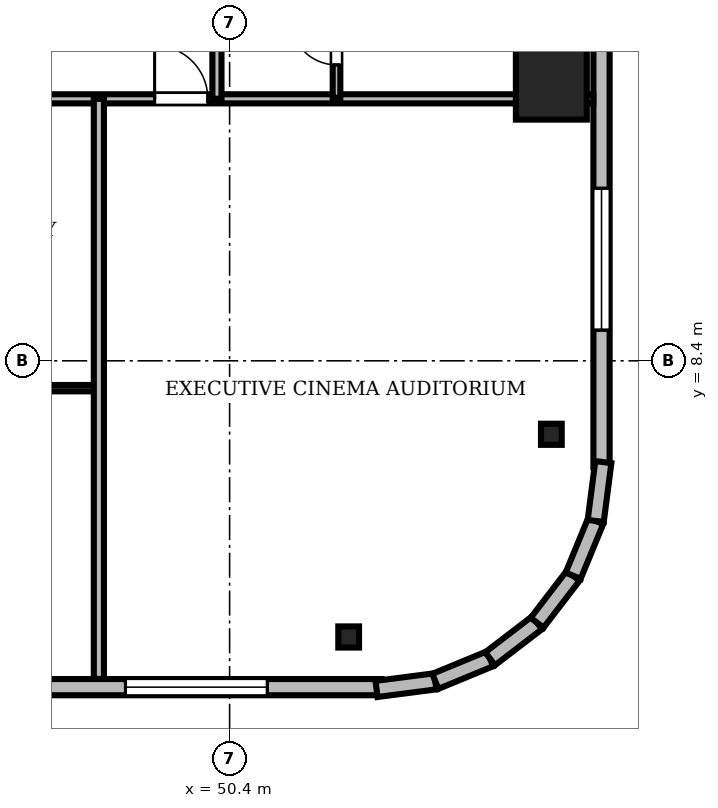
"""IFC4 building model, lengths in metres.
Left out: names, types, materials, properties, quantities, classifications, styles, units other than length and angle.
Written with IfcOpenShell. Run it as: python <this file> out.ifc"""

import sys

from ifc_helpers import new_model, si_unit, direction, frame, frame_2d, origin, origin_2d, place, context, subcontext, project, spatial, rectangle, i_section, extrude, source, transform, mapped, element, fill, save


model = new_model("IFC4")
c1 = context("Model", 3, precision=1e-05, world=origin(), true_north=direction((0.0, 1.0)))
c2 = subcontext(c1, "Body", "Model", "MODEL_VIEW")
j1 = project(units=[si_unit("LENGTHUNIT", "METRE"), si_unit("PLANEANGLEUNIT", "RADIAN")], contexts=[c1])
p1 = place(None, origin())
s1 = spatial("IfcSite", under=j1, at=p1, CompositionType="ELEMENT")
p2 = place(p1, origin())
s2 = spatial("IfcBuilding", under=s1, at=p2, CompositionType="ELEMENT")
p3 = place(p2, frame((0.0, 0.0, 218.55)))
s3 = spatial("IfcBuildingStorey", under=s2, at=p3, CompositionType="ELEMENT", Elevation=218.55)
m1 = source(origin(), c2, "Body", "SweptSolid", [
    extrude(rectangle(XDim=1.4, YDim=1.4, at=origin_2d()), origin(), (0.0, 0.0, 1.0), 3.53),
])
p4 = place(p3, frame((56.75, 13.86, 0.0), z_axis=(0.0, 0.0, 1.0), x_axis=(1.0, 0.0, 0.0)))
e1 = element("IfcColumn", 1, at=p4, inside=s3, PredefinedType="COLUMN", context=c2, shape_type="MappedRepresentation", body=[
    mapped(m1, transform((0.0, 0.0, 0.0), scale=1.0)),
])
m2 = source(origin(), c2, "Body", "SweptSolid", [
    extrude(i_section(OverallWidth=0.409, OverallDepth=0.417, WebThickness=0.021, FlangeThickness=0.033, FilletRadius=0.015, at=origin_2d()), origin(), (0.0, 0.0, 1.0), 3.53),
])
for number, where, z_axis, x_axis in (
    (2, (52.75, 2.95, 0.0), (0.0, 0.0, 1.0), (1.0, 0.0, 0.0)),
    (3, (56.75, 6.95, 0.0), (0.0, 0.0, 1.0), (1.0, 0.0, 0.0)),
):
    element("IfcColumn", number, at=place(p3, frame(where, z_axis=z_axis, x_axis=x_axis)), inside=s3, PredefinedType="COLUMN", context=c2, shape_type="MappedRepresentation", body=[
        mapped(m2, transform((0.0, 0.0, 0.0), scale=1.0)),
    ])
m3 = source(origin(), c2, "Body", "SweptSolid", [
    extrude(rectangle(XDim=15.6, YDim=0.32, at=frame_2d((7.8, 0.0))), origin(), (0.0, 0.0, 1.0), 3.53),
])
p5 = place(p3, frame((37.8, 1.96, 0.0), z_axis=(0.0, 0.0, 1.0), x_axis=(1.0, 0.0, 0.0)))
e4 = element("IfcWall", 4, at=p5, inside=s3, PredefinedType="SOLIDWALL", context=c2, shape_type="MappedRepresentation", body=[
    mapped(m3, transform((0.0, 0.0, 0.0), scale=1.0)),
])
m4 = source(origin(), c2, "Body", "SweptSolid", [
    extrude(rectangle(XDim=2.8, YDim=2.4, at=frame_2d((1.4, 1.2))), frame((0.0, 0.17, 0.0), z_axis=(0.0, -1.0, 0.0), x_axis=(1.0, 0.0, 0.0)), (0.0, 0.0, 1.0), 0.34),
])
p6 = place(p5, frame((10.545, 0.0, 0.72)))
e5 = element("IfcOpeningElement", 5, at=p6, cuts=e4, PredefinedType="OPENING", context=c2, shape_type="MappedRepresentation", body=[
    mapped(m4, transform((0.0, 0.0, 0.0), scale=1.0)),
])
p7 = place(p3, frame((57.74, 6.3, 0.0), z_axis=(0.0, 0.0, 1.0), x_axis=(0.0, 1.0, 0.0)))
e6 = element("IfcWall", 6, at=p7, inside=s3, PredefinedType="SOLIDWALL", context=c2, shape_type="MappedRepresentation", body=[
    mapped(m3, transform((0.0, 0.0, 0.0), scale=1.0)),
])
m5 = source(origin(), c2, "Body", "SweptSolid", [
    extrude(rectangle(XDim=1.4, YDim=2.3, at=frame_2d((0.7, 1.15))), frame((0.0, 0.17, 0.0), z_axis=(0.0, -1.0, 0.0), x_axis=(1.0, 0.0, 0.0)), (0.0, 0.0, 1.0), 0.34),
])
p8 = place(p7, frame((9.61, 0.0, 0.0)))
e7 = element("IfcOpeningElement", 7, at=p8, cuts=e6, PredefinedType="OPENING", context=c2, shape_type="MappedRepresentation", body=[
    mapped(m5, transform((0.0, 0.0, 0.0), scale=1.0)),
])
p9 = place(p7, frame((2.705, 0.0, 0.72)))
e8 = element("IfcOpeningElement", 8, at=p9, cuts=e6, PredefinedType="OPENING", context=c2, shape_type="MappedRepresentation", body=[
    mapped(m4, transform((0.0, 0.0, 0.0), scale=1.0)),
])
m6 = source(origin(), c2, "Body", "SweptSolid", [
    extrude(rectangle(XDim=1.17, YDim=0.32, at=frame_2d((0.585, 0.0))), origin(), (0.0, 0.0, 1.0), 3.53),
])
p10 = place(p3, frame((53.3, 1.925, 0.0), z_axis=(0.0, 0.0, 1.0), x_axis=(0.991762485493, 0.128090485085, 0.0)))
e9 = element("IfcWall", 9, at=p10, inside=s3, PredefinedType="SOLIDWALL", context=c2, shape_type="MappedRepresentation", body=[
    mapped(m6, transform((0.0, 0.0, 0.0), scale=1.0)),
])
m7 = source(origin(), c2, "Body", "SweptSolid", [
    extrude(rectangle(XDim=1.169, YDim=0.32, at=frame_2d((0.585, 0.0))), origin(), (0.0, 0.0, 1.0), 3.53),
])
p11 = place(p3, frame((54.46, 2.074, 0.0), z_axis=(0.0, 0.0, 1.0), x_axis=(0.924479075121, 0.381232789334, 0.0)))
e10 = element("IfcWall", 10, at=p11, inside=s3, PredefinedType="SOLIDWALL", context=c2, shape_type="MappedRepresentation", body=[
    mapped(m7, transform((0.0, 0.0, 0.0), scale=1.0)),
])
m8 = source(origin(), c2, "Body", "SweptSolid", [
    extrude(rectangle(XDim=1.169, YDim=0.32, at=frame_2d((0.584, 0.0))), origin(), (0.0, 0.0, 1.0), 3.53),
])
p12 = place(p3, frame((55.541, 2.52, 0.0), z_axis=(0.0, 0.0, 1.0), x_axis=(0.793663520347, 0.608356981114, 0.0)))
e11 = element("IfcWall", 11, at=p12, inside=s3, PredefinedType="SOLIDWALL", context=c2, shape_type="MappedRepresentation", body=[
    mapped(m8, transform((0.0, 0.0, 0.0), scale=1.0)),
])
m9 = source(origin(), c2, "Body", "SweptSolid", [
    extrude(rectangle(XDim=1.169, YDim=0.32, at=frame_2d((0.584, 0.0))), origin(), (0.0, 0.0, 1.0), 3.53),
])
for number, where, z_axis, x_axis in (
    (12, (56.469, 3.231, 0.0), (0.0, 0.0, 1.0), (0.608, 0.794, 0.0)),
    (13, (57.18, 4.159, 0.0), (0.0, 0.0, 1.0), (0.381, 0.925, 0.0)),
):
    element("IfcWall", number, at=place(p3, frame(where, z_axis=z_axis, x_axis=x_axis)), inside=s3, PredefinedType="SOLIDWALL", context=c2, shape_type="MappedRepresentation", body=[
        mapped(m9, transform((0.0, 0.0, 0.0), scale=1.0)),
    ])
m10 = source(origin(), c2, "Body", "SweptSolid", [
    extrude(rectangle(XDim=1.171, YDim=0.32, at=frame_2d((0.585, 0.0))), origin(), (0.0, 0.0, 1.0), 3.53),
])
p13 = place(p3, frame((57.625, 5.24, 0.0), z_axis=(0.0, 0.0, 1.0), x_axis=(0.128269133229, 0.991739395941, 0.0)))
e14 = element("IfcWall", 14, at=p13, inside=s3, PredefinedType="SOLIDWALL", context=c2, shape_type="MappedRepresentation", body=[
    mapped(m10, transform((0.0, 0.0, 0.0), scale=1.0)),
])
m11 = source(origin(), c2, "Body", "SweptSolid", [
    extrude(rectangle(XDim=46.156, YDim=0.18, at=frame_2d((23.078, 0.0))), origin(), (0.0, 0.0, 1.0), 2.772),
])
p14 = place(p3, frame((11.422, 13.57, 0.0), z_axis=(0.0, 0.0, 1.0), x_axis=(1.0, 0.0, 0.0)))
e15 = element("IfcWall", 15, at=p14, inside=s3, PredefinedType="PARTITIONING", context=c2, shape_type="MappedRepresentation", body=[
    mapped(m11, transform((0.0, 0.0, 0.0), scale=1.0)),
])
m12 = source(origin(), c2, "Body", "SweptSolid", [
    extrude(rectangle(XDim=1.05, YDim=2.2, at=frame_2d((0.525, 1.1))), frame((0.0, 0.1, 0.0), z_axis=(0.0, -1.0, 0.0), x_axis=(1.0, 0.0, 0.0)), (0.0, 0.0, 1.0), 0.2),
])
p15 = place(p14, frame((10.438, 0.0, 0.0)))
e16 = element("IfcOpeningElement", 16, at=p15, cuts=e15, PredefinedType="OPENING", context=c2, shape_type="MappedRepresentation", body=[
    mapped(m12, transform((0.0, 0.0, 0.0), scale=1.0)),
])
p16 = place(p14, frame((13.218, 0.0, 0.0)))
e17 = element("IfcOpeningElement", 17, at=p16, cuts=e15, PredefinedType="OPENING", context=c2, shape_type="MappedRepresentation", body=[
    mapped(m12, transform((0.0, 0.0, 0.0), scale=1.0)),
])
p17 = place(p14, frame((16.893, 0.0, 0.0)))
e18 = element("IfcOpeningElement", 18, at=p17, cuts=e15, PredefinedType="OPENING", context=c2, shape_type="MappedRepresentation", body=[
    mapped(m12, transform((0.0, 0.0, 0.0), scale=1.0)),
])
p18 = place(p14, frame((20.346, 0.0, 0.0)))
e19 = element("IfcOpeningElement", 19, at=p18, cuts=e15, PredefinedType="OPENING", context=c2, shape_type="MappedRepresentation", body=[
    mapped(m12, transform((0.0, 0.0, 0.0), scale=1.0)),
])
p19 = place(p14, frame((24.124, 0.0, 0.0)))
e20 = element("IfcOpeningElement", 20, at=p19, cuts=e15, PredefinedType="OPENING", context=c2, shape_type="MappedRepresentation", body=[
    mapped(m12, transform((0.0, 0.0, 0.0), scale=1.0)),
])
p20 = place(p14, frame((28.226, 0.0, 0.0)))
e21 = element("IfcOpeningElement", 21, at=p20, cuts=e15, PredefinedType="OPENING", context=c2, shape_type="MappedRepresentation", body=[
    mapped(m12, transform((0.0, 0.0, 0.0), scale=1.0)),
])
p21 = place(p14, frame((33.077, 0.0, 0.0)))
e22 = element("IfcOpeningElement", 22, at=p21, cuts=e15, PredefinedType="OPENING", context=c2, shape_type="MappedRepresentation", body=[
    mapped(m12, transform((0.0, 0.0, 0.0), scale=1.0)),
])
p22 = place(p14, frame((37.498, 0.0, 0.0)))
e23 = element("IfcOpeningElement", 23, at=p22, cuts=e15, PredefinedType="OPENING", context=c2, shape_type="MappedRepresentation", body=[
    mapped(m12, transform((0.0, 0.0, 0.0), scale=1.0)),
])
m13 = source(origin(), c2, "Body", "SweptSolid", [
    extrude(rectangle(XDim=27.53, YDim=0.18, at=frame_2d((13.765, 0.0))), origin(), (0.0, 0.0, 1.0), 2.972),
])
p23 = place(p3, frame((50.15, 13.57, 0.0), z_axis=(0.0, 0.0, 1.0), x_axis=(0.0, 1.0, 0.0)))
e24 = element("IfcWall", 24, at=p23, inside=s3, PredefinedType="PARTITIONING", context=c2, shape_type="MappedRepresentation", body=[
    mapped(m13, transform((0.0, 0.0, 0.0), scale=1.0)),
])
p24 = place(p23, frame((5.217, 0.0, 0.0)))
e25 = element("IfcOpeningElement", 25, at=p24, cuts=e24, PredefinedType="OPENING", context=c2, shape_type="MappedRepresentation", body=[
    mapped(m12, transform((0.0, 0.0, 0.0), scale=1.0)),
])
p25 = place(p23, frame((14.32, 0.0, 0.0)))
e26 = element("IfcOpeningElement", 26, at=p25, cuts=e24, PredefinedType="OPENING", context=c2, shape_type="MappedRepresentation", body=[
    mapped(m12, transform((0.0, 0.0, 0.0), scale=1.0)),
])
p26 = place(p23, frame((23.423, 0.0, 0.0)))
e27 = element("IfcOpeningElement", 27, at=p26, cuts=e24, PredefinedType="OPENING", context=c2, shape_type="MappedRepresentation", body=[
    mapped(m12, transform((0.0, 0.0, 0.0), scale=1.0)),
])
m14 = source(origin(), c2, "Body", "SweptSolid", [
    extrude(rectangle(XDim=5.602, YDim=0.125, at=frame_2d((2.801, 0.0))), origin(), (0.0, 0.0, 1.0), 2.972),
])
p27 = place(p3, frame((42.218, 7.86, 0.0), z_axis=(0.0, 0.0, 1.0), x_axis=(1.0, 0.0, 0.0)))
e28 = element("IfcWall", 28, at=p27, inside=s3, PredefinedType="PARTITIONING", context=c2, shape_type="MappedRepresentation", body=[
    mapped(m14, transform((0.0, 0.0, 0.0), scale=1.0)),
])
m15 = source(origin(), c2, "Body", "SweptSolid", [
    extrude(rectangle(XDim=0.95, YDim=2.15, at=frame_2d((0.475, 1.075))), frame((0.0, 0.073, 0.0), z_axis=(0.0, -1.0, 0.0), x_axis=(1.0, 0.0, 0.0)), (0.0, 0.0, 1.0), 0.145),
])
p28 = place(p27, frame((2.321, 0.0, 0.0)))
e29 = element("IfcOpeningElement", 29, at=p28, cuts=e28, PredefinedType="OPENING", context=c2, shape_type="MappedRepresentation", body=[
    mapped(m15, transform((0.0, 0.0, 0.0), scale=1.0)),
])
m16 = source(origin(), c2, "Body", "SweptSolid", [
    extrude(rectangle(XDim=2.29, YDim=0.15, at=frame_2d((1.145, 0.0))), origin(), (0.0, 0.0, 1.0), 2.972),
])
p29 = place(p3, frame((52.51, 13.59, 0.0), z_axis=(0.0, 0.0, 1.0), x_axis=(0.0, 1.0, 0.0)))
e30 = element("IfcWall", 30, at=p29, inside=s3, PredefinedType="PARTITIONING", context=c2, shape_type="MappedRepresentation", body=[
    mapped(m16, transform((0.0, 0.0, 0.0), scale=1.0)),
])
m17 = source(origin(), c2, "Body", "SweptSolid", [
    extrude(rectangle(XDim=0.9, YDim=2.1, at=frame_2d((0.45, 1.05))), frame((0.0, 0.085, 0.0), z_axis=(0.0, -1.0, 0.0), x_axis=(1.0, 0.0, 0.0)), (0.0, 0.0, 1.0), 0.17),
])
p30 = place(p29, frame((0.65, 0.0, 0.0)))
e31 = element("IfcOpeningElement", 31, at=p30, cuts=e30, PredefinedType="OPENING", context=c2, shape_type="MappedRepresentation", body=[
    mapped(m17, transform((0.0, 0.0, 0.0), scale=1.0)),
])
m18 = source(origin(), c2, "Body", "SweptSolid", [
    extrude(rectangle(XDim=11.448, YDim=0.2, at=frame_2d((5.724, 0.0))), origin(), (0.0, 0.0, 1.0), 2.772),
])
p31 = place(p3, frame((47.82, 2.122, 0.0), z_axis=(0.0, 0.0, 1.0), x_axis=(0.0, 1.0, 0.0)))
e32 = element("IfcWall", 32, at=p31, inside=s3, PredefinedType="PARTITIONING", context=c2, shape_type="MappedRepresentation", body=[
    mapped(m18, transform((0.0, 0.0, 0.0), scale=1.0)),
])
m19 = source(origin(), c2, "Body", "SweptSolid", [
    extrude(rectangle(XDim=2.8, YDim=2.4, at=frame_2d((1.4, 1.2))), frame((0.0, 0.03, 0.0), z_axis=(0.0, -1.0, 0.0), x_axis=(1.0, 0.0, 0.0)), (0.0, 0.0, 1.0), 0.06),
])
p32 = place(p6, origin())
e33 = element("IfcWindow", 33, at=p32, inside=s3, PartitioningType="SINGLE_PANEL", PredefinedType="WINDOW", context=c2, shape_type="MappedRepresentation", body=[
    mapped(m19, transform((0.0, 0.0, 0.0), scale=1.0)),
])
fill(e5, e33)
p33 = place(p9, origin())
e34 = element("IfcWindow", 34, at=p33, inside=s3, PartitioningType="SINGLE_PANEL", PredefinedType="WINDOW", context=c2, shape_type="MappedRepresentation", body=[
    mapped(m19, transform((0.0, 0.0, 0.0), scale=1.0)),
])
fill(e8, e34)
m20 = source(origin(), c2, "Body", "SweptSolid", [
    extrude(rectangle(XDim=1.05, YDim=2.2, at=frame_2d((0.525, 1.1))), frame((0.0, 0.025, 0.0), z_axis=(0.0, -1.0, 0.0), x_axis=(1.0, 0.0, 0.0)), (0.0, 0.0, 1.0), 0.05),
])
p34 = place(p22, origin())
e35 = element("IfcDoor", 35, at=p34, inside=s3, OperationType="SINGLE_SWING_LEFT", PredefinedType="DOOR", context=c2, shape_type="MappedRepresentation", body=[
    mapped(m20, transform((0.0, 0.0, 0.0), scale=1.0)),
])
fill(e23, e35)
m21 = source(origin(), c2, "Body", "SweptSolid", [
    extrude(rectangle(XDim=0.9, YDim=2.1, at=frame_2d((0.45, 1.05))), frame((0.0, 0.025, 0.0), z_axis=(0.0, -1.0, 0.0), x_axis=(1.0, 0.0, 0.0)), (0.0, 0.0, 1.0), 0.05),
])
p35 = place(p30, origin())
e36 = element("IfcDoor", 36, at=p35, inside=s3, OperationType="SINGLE_SWING_RIGHT", PredefinedType="DOOR", context=c2, shape_type="MappedRepresentation", body=[
    mapped(m21, transform((0.0, 0.0, 0.0), scale=1.0)),
])
fill(e31, e36)
save(model, sys.argv[1])
